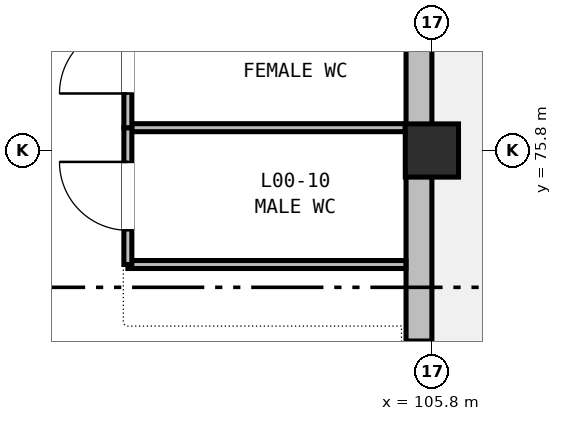
"""IFC4 building model, lengths in metres.
Left out: names, types, materials, properties, quantities, classifications, styles, units other than length and angle.
Written with IfcOpenShell. Run it as: python <this file> out.ifc"""

import sys

from ifc_helpers import new_model, si_unit, direction, frame, frame_2d, origin, origin_2d, place, context, subcontext, project, spatial, rectangle, extrude, element, fill, save


model = new_model("IFC4")
c1 = context("Model", 3, precision=1e-05, world=origin(), true_north=direction((0.0, 1.0)))
c2 = subcontext(c1, "Body", "Model", "MODEL_VIEW")
j1 = project(units=[si_unit("LENGTHUNIT", "METRE"), si_unit("PLANEANGLEUNIT", "RADIAN")], contexts=[c1])
p1 = place(None, origin())
s1 = spatial("IfcSite", under=j1, at=p1, CompositionType="ELEMENT")
p2 = place(p1, origin())
s2 = spatial("IfcBuilding", under=s1, at=p2, CompositionType="ELEMENT")
p3 = place(p2, origin())
s3 = spatial("IfcBuildingStorey", under=s2, at=p3, CompositionType="ELEMENT", Elevation=0.0)
p4 = place(p3, frame((105.8, 75.8, -0.32), z_axis=(0.0, 0.0, 1.0), x_axis=(1.0, 0.0, 0.0)))
e1 = element("IfcColumn", 1, at=p4, inside=s3, PredefinedType="COLUMN", context=c2, shape_type="SweptSolid", body=[
    extrude(rectangle(XDim=0.7, YDim=0.7, at=origin_2d()), origin(), (0.0, 0.0, 1.0), 5.72),
])
p5 = place(p3, frame((105.63, 83.86, 0.0), z_axis=(0.0, 0.0, 1.0), x_axis=(0.0, -1.0, 0.0)))
e2 = element("IfcWall", 2, at=p5, inside=s3, PredefinedType="STANDARD", context=c2, shape_type="SweptSolid", body=[
    extrude(rectangle(XDim=8.06, YDim=0.34, at=frame_2d((4.03, 0.0))), origin(), (0.0, 0.0, 1.0), 4.535),
])
p6 = place(p5, frame((1.001, 0.0, 0.9)))
e3 = element("IfcOpeningElement", 3, at=p6, cuts=e2, PredefinedType="OPENING", context=c2, shape_type="SweptSolid", body=[
    extrude(rectangle(XDim=2.35, YDim=1.5, at=frame_2d((1.175, 0.75))), frame((0.0, 0.18, 0.0), z_axis=(0.0, -1.0, 0.0), x_axis=(1.0, 0.0, 0.0)), (0.0, 0.0, 1.0), 0.36),
])
p7 = place(p3, frame((105.63, 75.8, 0.0), z_axis=(0.0, 0.0, 1.0), x_axis=(0.0, -1.0, 0.0)))
e4 = element("IfcWall", 4, at=p7, inside=s3, PredefinedType="STANDARD", context=c2, shape_type="SweptSolid", body=[
    extrude(rectangle(XDim=8.06, YDim=0.34, at=frame_2d((4.03, 0.0))), origin(), (0.0, 0.0, 1.0), 4.535),
])
p8 = place(p7, frame((2.49, 0.0, 0.75)))
e5 = element("IfcOpeningElement", 5, at=p8, cuts=e4, PredefinedType="OPENING", context=c2, shape_type="SweptSolid", body=[
    extrude(rectangle(XDim=1.3, YDim=2.4, at=frame_2d((0.65, 1.2))), frame((0.0, 0.18, 0.0), z_axis=(0.0, -1.0, 0.0), x_axis=(1.0, 0.0, 0.0)), (0.0, 0.0, 1.0), 0.36),
])
p9 = place(p7, frame((5.234, 0.0, 0.75)))
e6 = element("IfcOpeningElement", 6, at=p9, cuts=e4, PredefinedType="OPENING", context=c2, shape_type="SweptSolid", body=[
    extrude(rectangle(XDim=1.3, YDim=2.4, at=frame_2d((0.65, 1.2))), frame((0.0, 0.18, 0.0), z_axis=(0.0, -1.0, 0.0), x_axis=(1.0, 0.0, 0.0)), (0.0, 0.0, 1.0), 0.36),
])
p10 = place(p3, frame((101.8, 76.1, 0.0), z_axis=(0.0, 0.0, 1.0), x_axis=(1.0, 0.0, 0.0)))
e7 = element("IfcWall", 7, at=p10, inside=s3, PredefinedType="PARTITIONING", context=c2, shape_type="SweptSolid", body=[
    extrude(rectangle(XDim=3.65, YDim=0.105, at=frame_2d((1.825, 0.0))), origin(), (0.0, 0.0, 1.0), 4.735),
])
p11 = place(p3, frame((105.458, 74.3, 0.0), z_axis=(0.0, 0.0, 1.0), x_axis=(-1.0, 0.0, 0.0)))
e8 = element("IfcWall", 8, at=p11, inside=s3, PredefinedType="PARTITIONING", context=c2, shape_type="SweptSolid", body=[
    extrude(rectangle(XDim=3.658, YDim=0.105, at=frame_2d((1.829, 0.0))), origin(), (0.0, 0.0, 1.0), 4.535),
])
p12 = place(p3, frame((101.8, 74.3, 0.0), z_axis=(0.0, 0.0, 1.0), x_axis=(0.0, 1.0, 0.0)))
e9 = element("IfcWall", 9, at=p12, inside=s3, PredefinedType="PARTITIONING", context=c2, shape_type="SweptSolid", body=[
    extrude(rectangle(XDim=1.8, YDim=0.105, at=frame_2d((0.9, 0.0))), origin(), (0.0, 0.0, 1.0), 4.735),
])
p13 = place(p12, frame((0.45, 0.0, 0.0)))
e10 = element("IfcOpeningElement", 10, at=p13, cuts=e9, PredefinedType="OPENING", context=c2, shape_type="SweptSolid", body=[
    extrude(rectangle(XDim=0.9, YDim=2.02, at=frame_2d((0.45, 1.01))), frame((0.0, 0.062, 0.0), z_axis=(0.0, -1.0, 0.0), x_axis=(1.0, 0.0, 0.0)), (0.0, 0.0, 1.0), 0.125),
])
p14 = place(p3, frame((101.8, 76.1, 0.0), z_axis=(0.0, 0.0, 1.0), x_axis=(0.0, 1.0, 0.0)))
e11 = element("IfcWall", 11, at=p14, inside=s3, PredefinedType="PARTITIONING", context=c2, shape_type="SweptSolid", body=[
    extrude(rectangle(XDim=1.8, YDim=0.105, at=frame_2d((0.9, 0.0))), origin(), (0.0, 0.0, 1.0), 4.735),
])
p15 = place(p14, frame((0.45, 0.0, 0.0)))
e12 = element("IfcOpeningElement", 12, at=p15, cuts=e11, PredefinedType="OPENING", context=c2, shape_type="SweptSolid", body=[
    extrude(rectangle(XDim=0.9, YDim=2.02, at=frame_2d((0.45, 1.01))), frame((0.0, 0.062, 0.0), z_axis=(0.0, -1.0, 0.0), x_axis=(1.0, 0.0, 0.0)), (0.0, 0.0, 1.0), 0.125),
])
p16 = place(p8, origin())
e13 = element("IfcWindow", 13, at=p16, inside=s3, PartitioningType="SINGLE_PANEL", PredefinedType="WINDOW", context=c2, shape_type="SweptSolid", body=[
    extrude(rectangle(XDim=1.3, YDim=2.4, at=frame_2d((0.65, 1.2))), frame((0.0, 0.03, 0.0), z_axis=(0.0, -1.0, 0.0), x_axis=(1.0, 0.0, 0.0)), (0.0, 0.0, 1.0), 0.06),
])
fill(e5, e13)
p17 = place(p13, origin())
e14 = element("IfcDoor", 14, at=p17, inside=s3, OperationType="SINGLE_SWING_RIGHT", PredefinedType="DOOR", context=c2, shape_type="SweptSolid", body=[
    extrude(rectangle(XDim=0.9, YDim=2.02, at=frame_2d((0.45, 1.01))), frame((0.0, 0.025, 0.0), z_axis=(0.0, -1.0, 0.0), x_axis=(1.0, 0.0, 0.0)), (0.0, 0.0, 1.0), 0.05),
])
fill(e10, e14)
p18 = place(p15, origin())
e15 = element("IfcDoor", 15, at=p18, inside=s3, OperationType="SINGLE_SWING_LEFT", PredefinedType="DOOR", context=c2, shape_type="SweptSolid", body=[
    extrude(rectangle(XDim=0.9, YDim=2.02, at=frame_2d((0.45, 1.01))), frame((0.0, 0.025, 0.0), z_axis=(0.0, -1.0, 0.0), x_axis=(1.0, 0.0, 0.0)), (0.0, 0.0, 1.0), 0.05),
])
fill(e12, e15)
save(model, sys.argv[1])
